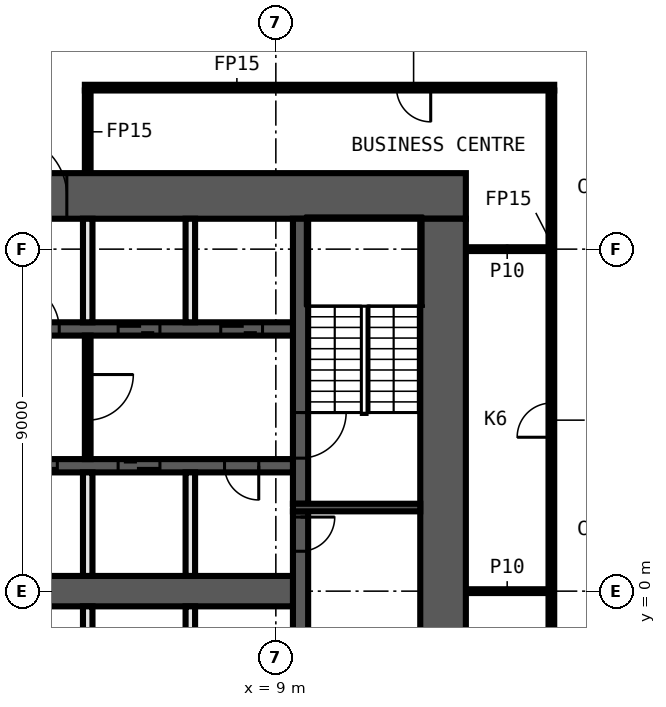
"""IFC4 building model, lengths in metres.
Left out: names, types, materials, properties, quantities, classifications, styles, units other than length and angle.
Written with IfcOpenShell. Run it as: python <this file> out.ifc"""

import sys

from ifc_helpers import new_model, si_unit, direction, frame, frame_2d, origin, place, context, subcontext, project, spatial, rectangle, extrude, element, fill, save


model = new_model("IFC4")
c1 = context("Model", 3, precision=1e-05, world=origin(), true_north=direction((0.0, 1.0)))
c2 = subcontext(c1, "Body", "Model", "MODEL_VIEW")
j1 = project(units=[si_unit("LENGTHUNIT", "METRE"), si_unit("PLANEANGLEUNIT", "RADIAN")], contexts=[c1])
p1 = place(None, origin())
s1 = spatial("IfcSite", under=j1, at=p1, CompositionType="ELEMENT")
p2 = place(p1, origin())
s2 = spatial("IfcBuilding", under=s1, at=p2, CompositionType="ELEMENT")
p3 = place(p2, frame((0.0, 0.0, 47.7)))
s3 = spatial("IfcBuildingStorey", under=s2, at=p3, CompositionType="ELEMENT", Elevation=47.7)
for number, where, z_axis, x_axis in (
    (1, (14.0, 0.0, 0.0), (0.0, 0.0, 1.0), (1.0, 0.0, 0.0)),
    (2, (14.0, 9.0, 0.0), (0.0, 0.0, 1.0), (1.0, 0.0, 0.0)),
):
    element("IfcWall", number, at=place(p3, frame(where, z_axis=z_axis, x_axis=x_axis)), inside=s3, PredefinedType="PARTITIONING", context=c2, shape_type="SweptSolid", body=[
        extrude(rectangle(XDim=2.175, YDim=0.1, at=frame_2d((1.087, 0.0))), origin(), (0.0, 0.0, 1.0), 3.3),
    ])
p4 = place(p3, frame((16.325, 13.25, 0.0), z_axis=(0.0, 0.0, 1.0), x_axis=(-1.0, 0.0, 0.0)))
e3 = element("IfcWall", 3, at=p4, inside=s3, PredefinedType="PARTITIONING", context=c2, shape_type="SweptSolid", body=[
    extrude(rectangle(XDim=12.35, YDim=0.15, at=frame_2d((6.175, 0.0))), origin(), (0.0, 0.0, 1.0), 3.3),
])
p5 = place(p4, frame((3.25, 0.0, 0.0)))
e4 = element("IfcOpeningElement", 4, at=p5, cuts=e3, PredefinedType="OPENING", context=c2, shape_type="SweptSolid", body=[
    extrude(rectangle(XDim=0.9, YDim=2.1, at=frame_2d((0.45, 1.05))), frame((0.0, 0.085, 0.0), z_axis=(0.0, -1.0, 0.0), x_axis=(1.0, 0.0, 0.0)), (0.0, 0.0, 1.0), 0.17),
])
p6 = place(p3, frame((16.25, -13.175, 0.0), z_axis=(0.0, 0.0, 1.0), x_axis=(0.0, 1.0, 0.0)))
e5 = element("IfcWall", 5, at=p6, inside=s3, PredefinedType="PARTITIONING", context=c2, shape_type="SweptSolid", body=[
    extrude(rectangle(XDim=26.35, YDim=0.15, at=frame_2d((13.175, 0.0))), origin(), (0.0, 0.0, 1.0), 3.3),
])
p7 = place(p6, frame((8.225, 0.0, 0.0)))
e6 = element("IfcOpeningElement", 6, at=p7, cuts=e5, PredefinedType="OPENING", context=c2, shape_type="SweptSolid", body=[
    extrude(rectangle(XDim=0.9, YDim=2.1, at=frame_2d((0.45, 1.05))), frame((0.0, 0.085, 0.0), z_axis=(0.0, -1.0, 0.0), x_axis=(1.0, 0.0, 0.0)), (0.0, 0.0, 1.0), 0.17),
])
p8 = place(p6, frame((17.225, 0.0, 0.0)))
e7 = element("IfcOpeningElement", 7, at=p8, cuts=e5, PredefinedType="OPENING", context=c2, shape_type="SweptSolid", body=[
    extrude(rectangle(XDim=0.9, YDim=2.1, at=frame_2d((0.45, 1.05))), frame((0.0, 0.085, 0.0), z_axis=(0.0, -1.0, 0.0), x_axis=(1.0, 0.0, 0.0)), (0.0, 0.0, 1.0), 0.17),
])
p9 = place(p3, frame((4.05, 11.0, 0.0), z_axis=(0.0, 0.0, 1.0), x_axis=(0.0, 1.0, 0.0)))
e8 = element("IfcWall", 8, at=p9, inside=s3, PredefinedType="PARTITIONING", context=c2, shape_type="SweptSolid", body=[
    extrude(rectangle(XDim=2.175, YDim=0.15, at=frame_2d((1.087, 0.0))), origin(), (0.0, 0.0, 1.0), 3.3),
])
p10 = place(p3, frame((-14.0, 10.4, 0.0), z_axis=(0.0, 0.0, 1.0), x_axis=(1.0, 0.0, 0.0)))
e9 = element("IfcWall", 9, at=p10, inside=s3, PredefinedType="SHEAR", context=c2, shape_type="SweptSolid", body=[
    extrude(rectangle(XDim=28.0, YDim=1.2, at=frame_2d((14.0, 0.0))), origin(), (0.0, 0.0, 1.0), 3.3),
])
p11 = place(p10, frame((15.9, 0.0, 0.0)))
e10 = element("IfcOpeningElement", 10, at=p11, cuts=e9, PredefinedType="OPENING", context=c2, shape_type="SweptSolid", body=[
    extrude(rectangle(XDim=1.6, YDim=2.1, at=frame_2d((0.8, 1.05))), frame((0.0, 0.61, 0.0), z_axis=(0.0, -1.0, 0.0), x_axis=(1.0, 0.0, 0.0)), (0.0, 0.0, 1.0), 1.22),
])
p12 = place(p3, frame((13.4, 9.8, 0.0), z_axis=(0.0, 0.0, 1.0), x_axis=(0.0, -1.0, 0.0)))
e11 = element("IfcWall", 11, at=p12, inside=s3, PredefinedType="SHEAR", context=c2, shape_type="SweptSolid", body=[
    extrude(rectangle(XDim=19.6, YDim=1.2, at=frame_2d((9.8, 0.0))), origin(), (0.0, 0.0, 1.0), 3.3),
])
p13 = place(p3, frame((9.65, 2.1, 0.0), z_axis=(0.0, 0.0, 1.0), x_axis=(0.0, -1.0, 0.0)))
e12 = element("IfcWall", 12, at=p13, inside=s3, PredefinedType="SHEAR", context=c2, shape_type="SweptSolid", body=[
    extrude(rectangle(XDim=4.2, YDim=0.4, at=frame_2d((2.1, 0.0))), origin(), (0.0, 0.0, 1.0), 3.3),
])
p14 = place(p13, frame((0.15, 0.0, 0.0)))
e13 = element("IfcOpeningElement", 13, at=p14, cuts=e12, PredefinedType="OPENING", context=c2, shape_type="SweptSolid", body=[
    extrude(rectangle(XDim=0.9, YDim=2.1, at=frame_2d((0.45, 1.05))), frame((0.0, 0.21, 0.0), z_axis=(0.0, -1.0, 0.0), x_axis=(1.0, 0.0, 0.0)), (0.0, 0.0, 1.0), 0.42),
])
p15 = place(p3, frame((9.65, 9.8, 0.0), z_axis=(0.0, 0.0, 1.0), x_axis=(0.0, -1.0, 0.0)))
e14 = element("IfcWall", 14, at=p15, inside=s3, PredefinedType="SHEAR", context=c2, shape_type="SweptSolid", body=[
    extrude(rectangle(XDim=7.5, YDim=0.4, at=frame_2d((3.75, 0.0))), origin(), (0.0, 0.0, 1.0), 3.3),
])
p16 = place(p15, frame((5.1, 0.0, 0.0)))
e15 = element("IfcOpeningElement", 15, at=p16, cuts=e14, PredefinedType="OPENING", context=c2, shape_type="SweptSolid", body=[
    extrude(rectangle(XDim=1.2, YDim=2.1, at=frame_2d((0.6, 1.05))), frame((0.0, 0.21, 0.0), z_axis=(0.0, -1.0, 0.0), x_axis=(1.0, 0.0, 0.0)), (0.0, 0.0, 1.0), 0.42),
])
p17 = place(p3, frame((9.45, 2.2, 0.0), z_axis=(0.0, 0.0, 1.0), x_axis=(1.0, 0.0, 0.0)))
e16 = element("IfcWall", 16, at=p17, inside=s3, PredefinedType="SHEAR", context=c2, shape_type="SweptSolid", body=[
    extrude(rectangle(XDim=3.35, YDim=0.2, at=frame_2d((1.675, 0.0))), origin(), (0.0, 0.0, 1.0), 3.3),
])
p18 = place(p3, frame((-9.45, 6.9, 0.0), z_axis=(0.0, 0.0, 1.0), x_axis=(1.0, 0.0, 0.0)))
e17 = element("IfcWall", 17, at=p18, inside=s3, PredefinedType="SHEAR", context=c2, shape_type="SweptSolid", body=[
    extrude(rectangle(XDim=18.9, YDim=0.35, at=frame_2d((9.45, 0.0))), origin(), (0.0, 0.0, 1.0), 3.3),
])
p19 = place(p18, frame((0.8, 0.0, 0.0)))
e18 = element("IfcOpeningElement", 18, at=p19, cuts=e17, PredefinedType="OPENING", context=c2, shape_type="SweptSolid", body=[
    extrude(rectangle(XDim=1.1, YDim=2.1, at=frame_2d((0.55, 1.05))), frame((0.0, 0.185, 0.0), z_axis=(0.0, -1.0, 0.0), x_axis=(1.0, 0.0, 0.0)), (0.0, 0.0, 1.0), 0.37),
])
p20 = place(p18, frame((3.5, 0.0, 0.0)))
e19 = element("IfcOpeningElement", 19, at=p20, cuts=e17, PredefinedType="OPENING", context=c2, shape_type="SweptSolid", body=[
    extrude(rectangle(XDim=1.1, YDim=2.1, at=frame_2d((0.55, 1.05))), frame((0.0, 0.185, 0.0), z_axis=(0.0, -1.0, 0.0), x_axis=(1.0, 0.0, 0.0)), (0.0, 0.0, 1.0), 0.37),
])
p21 = place(p18, frame((6.2, 0.0, 0.0)))
e20 = element("IfcOpeningElement", 20, at=p21, cuts=e17, PredefinedType="OPENING", context=c2, shape_type="SweptSolid", body=[
    extrude(rectangle(XDim=1.1, YDim=2.1, at=frame_2d((0.55, 1.05))), frame((0.0, 0.185, 0.0), z_axis=(0.0, -1.0, 0.0), x_axis=(1.0, 0.0, 0.0)), (0.0, 0.0, 1.0), 0.37),
])
p22 = place(p18, frame((8.9, 0.0, 0.0)))
e21 = element("IfcOpeningElement", 21, at=p22, cuts=e17, PredefinedType="OPENING", context=c2, shape_type="SweptSolid", body=[
    extrude(rectangle(XDim=1.1, YDim=2.1, at=frame_2d((0.55, 1.05))), frame((0.0, 0.185, 0.0), z_axis=(0.0, -1.0, 0.0), x_axis=(1.0, 0.0, 0.0)), (0.0, 0.0, 1.0), 0.37),
])
p23 = place(p18, frame((11.55, 0.0, 0.0)))
e22 = element("IfcOpeningElement", 22, at=p23, cuts=e17, PredefinedType="OPENING", context=c2, shape_type="SweptSolid", body=[
    extrude(rectangle(XDim=1.2, YDim=2.1, at=frame_2d((0.6, 1.05))), frame((0.0, 0.185, 0.0), z_axis=(0.0, -1.0, 0.0), x_axis=(1.0, 0.0, 0.0)), (0.0, 0.0, 1.0), 0.37),
])
p24 = place(p18, frame((14.3, 0.0, 0.0)))
e23 = element("IfcOpeningElement", 23, at=p24, cuts=e17, PredefinedType="OPENING", context=c2, shape_type="SweptSolid", body=[
    extrude(rectangle(XDim=1.1, YDim=2.1, at=frame_2d((0.55, 1.05))), frame((0.0, 0.185, 0.0), z_axis=(0.0, -1.0, 0.0), x_axis=(1.0, 0.0, 0.0)), (0.0, 0.0, 1.0), 0.37),
])
p25 = place(p18, frame((17.0, 0.0, 0.0)))
e24 = element("IfcOpeningElement", 24, at=p25, cuts=e17, PredefinedType="OPENING", context=c2, shape_type="SweptSolid", body=[
    extrude(rectangle(XDim=1.1, YDim=2.1, at=frame_2d((0.55, 1.05))), frame((0.0, 0.185, 0.0), z_axis=(0.0, -1.0, 0.0), x_axis=(1.0, 0.0, 0.0)), (0.0, 0.0, 1.0), 0.37),
])
p26 = place(p3, frame((9.45, 3.3, 0.0), z_axis=(0.0, 0.0, 1.0), x_axis=(-1.0, 0.0, 0.0)))
e25 = element("IfcWall", 25, at=p26, inside=s3, PredefinedType="SHEAR", context=c2, shape_type="SweptSolid", body=[
    extrude(rectangle(XDim=18.9, YDim=0.35, at=frame_2d((9.45, 0.0))), origin(), (0.0, 0.0, 1.0), 3.3),
])
p27 = place(p26, frame((17.0, 0.0, 0.0)))
e26 = element("IfcOpeningElement", 26, at=p27, cuts=e25, PredefinedType="OPENING", context=c2, shape_type="SweptSolid", body=[
    extrude(rectangle(XDim=1.1, YDim=2.1, at=frame_2d((0.55, 1.05))), frame((0.0, 0.185, 0.0), z_axis=(0.0, -1.0, 0.0), x_axis=(1.0, 0.0, 0.0)), (0.0, 0.0, 1.0), 0.37),
])
p28 = place(p26, frame((14.3, 0.0, 0.0)))
e27 = element("IfcOpeningElement", 27, at=p28, cuts=e25, PredefinedType="OPENING", context=c2, shape_type="SweptSolid", body=[
    extrude(rectangle(XDim=1.1, YDim=2.1, at=frame_2d((0.55, 1.05))), frame((0.0, 0.185, 0.0), z_axis=(0.0, -1.0, 0.0), x_axis=(1.0, 0.0, 0.0)), (0.0, 0.0, 1.0), 0.37),
])
p29 = place(p26, frame((11.6, 0.0, 0.0)))
e28 = element("IfcOpeningElement", 28, at=p29, cuts=e25, PredefinedType="OPENING", context=c2, shape_type="SweptSolid", body=[
    extrude(rectangle(XDim=1.1, YDim=2.1, at=frame_2d((0.55, 1.05))), frame((0.0, 0.185, 0.0), z_axis=(0.0, -1.0, 0.0), x_axis=(1.0, 0.0, 0.0)), (0.0, 0.0, 1.0), 0.37),
])
p30 = place(p26, frame((8.9, 0.0, 0.0)))
e29 = element("IfcOpeningElement", 29, at=p30, cuts=e25, PredefinedType="OPENING", context=c2, shape_type="SweptSolid", body=[
    extrude(rectangle(XDim=1.1, YDim=2.1, at=frame_2d((0.55, 1.05))), frame((0.0, 0.185, 0.0), z_axis=(0.0, -1.0, 0.0), x_axis=(1.0, 0.0, 0.0)), (0.0, 0.0, 1.0), 0.37),
])
p31 = place(p26, frame((6.2, 0.0, 0.0)))
e30 = element("IfcOpeningElement", 30, at=p31, cuts=e25, PredefinedType="OPENING", context=c2, shape_type="SweptSolid", body=[
    extrude(rectangle(XDim=1.1, YDim=2.1, at=frame_2d((0.55, 1.05))), frame((0.0, 0.185, 0.0), z_axis=(0.0, -1.0, 0.0), x_axis=(1.0, 0.0, 0.0)), (0.0, 0.0, 1.0), 0.37),
])
p32 = place(p26, frame((3.5, 0.0, 0.0)))
e31 = element("IfcOpeningElement", 31, at=p32, cuts=e25, PredefinedType="OPENING", context=c2, shape_type="SweptSolid", body=[
    extrude(rectangle(XDim=1.1, YDim=2.1, at=frame_2d((0.55, 1.05))), frame((0.0, 0.185, 0.0), z_axis=(0.0, -1.0, 0.0), x_axis=(1.0, 0.0, 0.0)), (0.0, 0.0, 1.0), 0.37),
])
p33 = place(p26, frame((0.9, 0.0, 0.0)))
e32 = element("IfcOpeningElement", 32, at=p33, cuts=e25, PredefinedType="OPENING", context=c2, shape_type="SweptSolid", body=[
    extrude(rectangle(XDim=0.9, YDim=2.1, at=frame_2d((0.45, 1.05))), frame((0.0, 0.185, 0.0), z_axis=(0.0, -1.0, 0.0), x_axis=(1.0, 0.0, 0.0)), (0.0, 0.0, 1.0), 0.37),
])
p34 = place(p3, frame((-9.45, 0.0, 0.0), z_axis=(0.0, 0.0, 1.0), x_axis=(1.0, 0.0, 0.0)))
e33 = element("IfcWall", 33, at=p34, inside=s3, PredefinedType="SHEAR", context=c2, shape_type="SweptSolid", body=[
    extrude(rectangle(XDim=18.9, YDim=0.8, at=frame_2d((9.45, 0.0))), origin(), (0.0, 0.0, 1.0), 3.3),
])
for number, where, z_axis, x_axis in (
    (34, (6.75, -3.125, 0.0), (0.0, 0.0, 1.0), (0.0, 1.0, 0.0)),
    (35, (6.75, 0.4, 0.0), (0.0, 0.0, 1.0), (0.0, 1.0, 0.0)),
    (36, (6.75, 7.075, 0.0), (0.0, 0.0, 1.0), (0.0, 1.0, 0.0)),
):
    element("IfcWall", number, at=place(p3, frame(where, z_axis=z_axis, x_axis=x_axis)), inside=s3, PredefinedType="SOLIDWALL", context=c2, shape_type="SweptSolid", body=[
        extrude(rectangle(XDim=2.725, YDim=0.25, at=frame_2d((1.363, 0.0))), origin(), (0.0, 0.0, 1.0), 3.3),
    ])
p35 = place(p3, frame((4.05, 6.725, 0.0), z_axis=(0.0, 0.0, 1.0), x_axis=(0.0, -1.0, 0.0)))
e37 = element("IfcWall", 37, at=p35, inside=s3, PredefinedType="PARTITIONING", context=c2, shape_type="SweptSolid", body=[
    extrude(rectangle(XDim=3.25, YDim=0.15, at=frame_2d((1.625, 0.0))), origin(), (0.0, 0.0, 1.0), 3.3),
])
p36 = place(p35, frame((1.025, 0.0, 0.0)))
e38 = element("IfcOpeningElement", 38, at=p36, cuts=e37, PredefinedType="OPENING", context=c2, shape_type="SweptSolid", body=[
    extrude(rectangle(XDim=1.2, YDim=2.1, at=frame_2d((0.6, 1.05))), frame((0.0, 0.085, 0.0), z_axis=(0.0, -1.0, 0.0), x_axis=(1.0, 0.0, 0.0)), (0.0, 0.0, 1.0), 0.17),
])
for number, where, z_axis, x_axis in (
    (39, (4.05, -3.125, 0.0), (0.0, 0.0, 1.0), (0.0, 1.0, 0.0)),
    (40, (4.05, 0.4, 0.0), (0.0, 0.0, 1.0), (0.0, 1.0, 0.0)),
    (41, (4.05, 7.075, 0.0), (0.0, 0.0, 1.0), (0.0, 1.0, 0.0)),
):
    element("IfcWall", number, at=place(p3, frame(where, z_axis=z_axis, x_axis=x_axis)), inside=s3, PredefinedType="SOLIDWALL", context=c2, shape_type="SweptSolid", body=[
        extrude(rectangle(XDim=2.725, YDim=0.25, at=frame_2d((1.363, 0.0))), origin(), (0.0, 0.0, 1.0), 3.3),
    ])
p37 = place(p8, origin())
e42 = element("IfcDoor", 42, at=p37, inside=s3, OperationType="SINGLE_SWING_RIGHT", PredefinedType="DOOR", context=c2, shape_type="SweptSolid", body=[
    extrude(rectangle(XDim=0.9, YDim=2.1, at=frame_2d((0.45, 1.05))), frame((0.0, 0.025, 0.0), z_axis=(0.0, -1.0, 0.0), x_axis=(1.0, 0.0, 0.0)), (0.0, 0.0, 1.0), 0.05),
])
fill(e7, e42)
p38 = place(p5, origin())
e43 = element("IfcDoor", 43, at=p38, inside=s3, OperationType="SINGLE_SWING_LEFT", PredefinedType="DOOR", context=c2, shape_type="SweptSolid", body=[
    extrude(rectangle(XDim=0.9, YDim=2.1, at=frame_2d((0.45, 1.05))), frame((0.0, 0.025, 0.0), z_axis=(0.0, -1.0, 0.0), x_axis=(1.0, 0.0, 0.0)), (0.0, 0.0, 1.0), 0.05),
])
fill(e4, e43)
p39 = place(p14, origin())
e44 = element("IfcDoor", 44, at=p39, inside=s3, OperationType="SINGLE_SWING_RIGHT", PredefinedType="DOOR", context=c2, shape_type="SweptSolid", body=[
    extrude(rectangle(XDim=0.9, YDim=2.1, at=frame_2d((0.45, 1.05))), frame((0.0, 0.025, 0.0), z_axis=(0.0, -1.0, 0.0), x_axis=(1.0, 0.0, 0.0)), (0.0, 0.0, 1.0), 0.05),
])
fill(e13, e44)
p40 = place(p11, origin())
e45 = element("IfcDoor", 45, at=p40, inside=s3, OperationType="DOUBLE_DOOR_SINGLE_SWING", PredefinedType="DOOR", context=c2, shape_type="SweptSolid", body=[
    extrude(rectangle(XDim=1.6, YDim=2.1, at=frame_2d((0.8, 1.05))), frame((0.0, 0.025, 0.0), z_axis=(0.0, -1.0, 0.0), x_axis=(1.0, 0.0, 0.0)), (0.0, 0.0, 1.0), 0.05),
])
fill(e10, e45)
p41 = place(p23, origin())
e46 = element("IfcDoor", 46, at=p41, inside=s3, OperationType="SINGLE_SWING_LEFT", PredefinedType="DOOR", context=c2, shape_type="SweptSolid", body=[
    extrude(rectangle(XDim=1.2, YDim=2.1, at=frame_2d((0.6, 1.05))), frame((0.0, 0.025, 0.0), z_axis=(0.0, -1.0, 0.0), x_axis=(1.0, 0.0, 0.0)), (0.0, 0.0, 1.0), 0.05),
])
fill(e22, e46)
p42 = place(p24, origin())
e47 = element("IfcDoor", 47, at=p42, inside=s3, OperationType="DOUBLE_DOOR_SLIDING", PredefinedType="DOOR", context=c2, shape_type="SweptSolid", body=[
    extrude(rectangle(XDim=1.1, YDim=2.1, at=frame_2d((0.55, 1.05))), frame((0.0, 0.025, 0.0), z_axis=(0.0, -1.0, 0.0), x_axis=(1.0, 0.0, 0.0)), (0.0, 0.0, 1.0), 0.05),
])
fill(e23, e47)
p43 = place(p25, origin())
e48 = element("IfcDoor", 48, at=p43, inside=s3, OperationType="DOUBLE_DOOR_SLIDING", PredefinedType="DOOR", context=c2, shape_type="SweptSolid", body=[
    extrude(rectangle(XDim=1.1, YDim=2.1, at=frame_2d((0.55, 1.05))), frame((0.0, 0.025, 0.0), z_axis=(0.0, -1.0, 0.0), x_axis=(1.0, 0.0, 0.0)), (0.0, 0.0, 1.0), 0.05),
])
fill(e24, e48)
p44 = place(p31, origin())
e49 = element("IfcDoor", 49, at=p44, inside=s3, OperationType="DOUBLE_DOOR_SLIDING", PredefinedType="DOOR", context=c2, shape_type="SweptSolid", body=[
    extrude(rectangle(XDim=1.1, YDim=2.1, at=frame_2d((0.55, 1.05))), frame((0.0, 0.025, 0.0), z_axis=(0.0, -1.0, 0.0), x_axis=(1.0, 0.0, 0.0)), (0.0, 0.0, 1.0), 0.05),
])
fill(e30, e49)
p45 = place(p32, origin())
e50 = element("IfcDoor", 50, at=p45, inside=s3, OperationType="DOUBLE_DOOR_SLIDING", PredefinedType="DOOR", context=c2, shape_type="SweptSolid", body=[
    extrude(rectangle(XDim=1.1, YDim=2.1, at=frame_2d((0.55, 1.05))), frame((0.0, 0.025, 0.0), z_axis=(0.0, -1.0, 0.0), x_axis=(1.0, 0.0, 0.0)), (0.0, 0.0, 1.0), 0.05),
])
fill(e31, e50)
p46 = place(p33, origin())
e51 = element("IfcDoor", 51, at=p46, inside=s3, OperationType="SINGLE_SWING_LEFT", PredefinedType="DOOR", context=c2, shape_type="SweptSolid", body=[
    extrude(rectangle(XDim=0.9, YDim=2.1, at=frame_2d((0.45, 1.05))), frame((0.0, 0.025, 0.0), z_axis=(0.0, -1.0, 0.0), x_axis=(1.0, 0.0, 0.0)), (0.0, 0.0, 1.0), 0.05),
])
fill(e32, e51)
p47 = place(p16, origin())
e52 = element("IfcDoor", 52, at=p47, inside=s3, OperationType="SINGLE_SWING_LEFT", PredefinedType="DOOR", context=c2, shape_type="SweptSolid", body=[
    extrude(rectangle(XDim=1.2, YDim=2.1, at=frame_2d((0.6, 1.05))), frame((0.0, 0.025, 0.0), z_axis=(0.0, -1.0, 0.0), x_axis=(1.0, 0.0, 0.0)), (0.0, 0.0, 1.0), 0.05),
])
fill(e15, e52)
p48 = place(p36, origin())
e53 = element("IfcDoor", 53, at=p48, inside=s3, OperationType="SINGLE_SWING_RIGHT", PredefinedType="DOOR", context=c2, shape_type="SweptSolid", body=[
    extrude(rectangle(XDim=1.2, YDim=2.1, at=frame_2d((0.6, 1.05))), frame((0.0, 0.025, 0.0), z_axis=(0.0, -1.0, 0.0), x_axis=(1.0, 0.0, 0.0)), (0.0, 0.0, 1.0), 0.05),
])
fill(e38, e53)
save(model, sys.argv[1])
